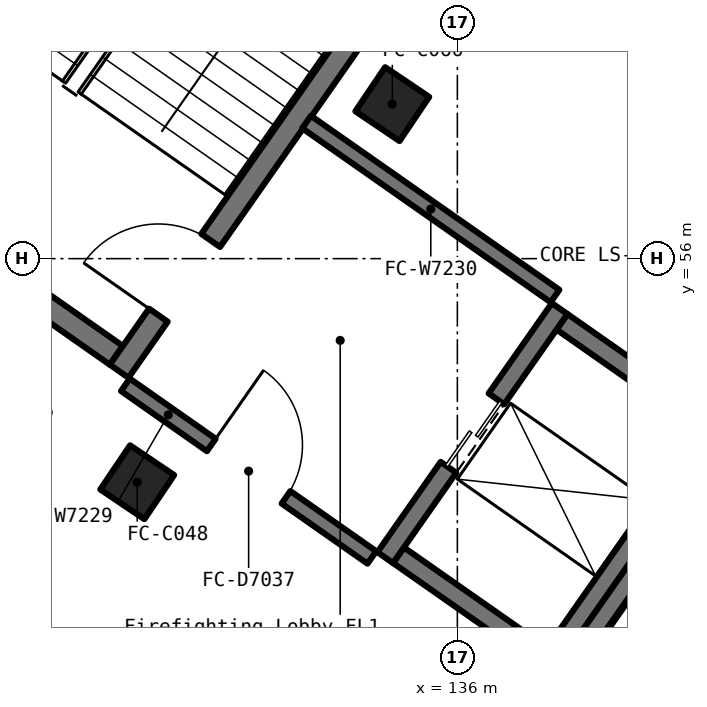
"""IFC4 building model, lengths in metres.
Left out: names, types, materials, properties, quantities, classifications, styles, units other than length and angle.
Written with IfcOpenShell. Run it as: python <this file> out.ifc"""

import sys

from ifc_helpers import new_model, si_unit, direction, frame, frame_2d, origin, origin_2d, place, context, subcontext, project, spatial, rectangle, extrude, element, fill, save


model = new_model("IFC4")
c1 = context("Model", 3, precision=1e-05, world=origin(), true_north=direction((0.0, 1.0)))
c2 = subcontext(c1, "Body", "Model", "MODEL_VIEW")
j1 = project(units=[si_unit("LENGTHUNIT", "METRE"), si_unit("PLANEANGLEUNIT", "RADIAN")], contexts=[c1])
p1 = place(None, origin())
s1 = spatial("IfcSite", under=j1, at=p1, CompositionType="ELEMENT")
p2 = place(p1, origin())
s2 = spatial("IfcBuilding", under=s1, at=p2, CompositionType="ELEMENT")
p3 = place(p2, frame((0.0, 0.0, -6.0)))
s3 = spatial("IfcBuildingStorey", under=s2, at=p3, CompositionType="ELEMENT", Elevation=-6.0)
for number, where, z_axis, x_axis in (
    (1, (131.788, 53.058, 0.0), (0.0, 0.0, 1.0), (0.829, -0.559, 0.0)),
    (2, (135.144, 58.033, 0.0), (0.0, 0.0, 1.0), (0.829, -0.559, 0.0)),
):
    element("IfcColumn", number, at=place(p3, frame(where, z_axis=z_axis, x_axis=x_axis)), inside=s3, PredefinedType="COLUMN", context=c2, shape_type="SweptSolid", body=[
        extrude(rectangle(XDim=0.7, YDim=0.7, at=origin_2d()), origin(), (0.0, 0.0, 1.0), 6.0),
    ])
p4 = place(p3, frame((127.418, 57.596, 0.0), z_axis=(0.0, 0.0, 1.0), x_axis=(0.819096538389, -0.573655698829, 0.0)))
e3 = element("IfcWall", 3, at=p4, inside=s3, PredefinedType="SOLIDWALL", context=c2, shape_type="SweptSolid", body=[
    extrude(rectangle(XDim=4.999, YDim=0.3, at=frame_2d((2.5, 0.0))), origin(), (0.0, 0.0, 1.0), 6.0),
])
p5 = place(p3, frame((131.55, 54.519, 0.0), z_axis=(0.0, 0.0, 1.0), x_axis=(0.573563925118, 0.819160804606, 0.0)))
e4 = element("IfcWall", 4, at=p5, inside=s3, PredefinedType="SOLIDWALL", context=c2, shape_type="SweptSolid", body=[
    extrude(rectangle(XDim=10.0, YDim=0.3, at=frame_2d((5.0, 0.0))), origin(), (0.0, 0.0, 1.0), 6.0),
])
p6 = place(p5, frame((0.9, 0.0, 0.0)))
e5 = element("IfcOpeningElement", 5, at=p6, cuts=e4, PredefinedType="OPENING", context=c2, shape_type="SweptSolid", body=[
    extrude(rectangle(XDim=1.2, YDim=2.1, at=frame_2d((0.6, 1.05))), frame((0.0, 0.162, 0.0), z_axis=(0.0, -1.0, 0.0), x_axis=(1.0, 0.0, 0.0)), (0.0, 0.0, 1.0), 0.324),
])
p7 = place(p3, frame((132.944, 65.751, 0.0), z_axis=(0.0, 0.0, 1.0), x_axis=(-0.573514776444, -0.819195215563, 0.0)))
e6 = element("IfcWall", 6, at=p7, inside=s3, PredefinedType="SOLIDWALL", context=c2, shape_type="SweptSolid", body=[
    extrude(rectangle(XDim=10.0, YDim=0.3, at=frame_2d((5.0, 0.0))), origin(), (0.0, 0.0, 1.0), 6.0),
])
p8 = place(p3, frame((135.225, 52.098, 0.0), z_axis=(0.0, 0.0, 1.0), x_axis=(0.819366508838, -0.573270027295, 0.0)))
e7 = element("IfcWall", 7, at=p8, inside=s3, PredefinedType="SOLIDWALL", context=c2, shape_type="SweptSolid", body=[
    extrude(rectangle(XDim=2.301, YDim=0.25, at=frame_2d((1.15, 0.0))), origin(), (0.0, 0.0, 1.0), 6.0),
])
p9 = place(p3, frame((137.141, 50.605, 0.0), z_axis=(0.0, 0.0, 1.0), x_axis=(0.573572956461, 0.819154480923, 0.0)))
e8 = element("IfcWall", 8, at=p9, inside=s3, PredefinedType="SOLIDWALL", context=c2, shape_type="SweptSolid", body=[
    extrude(rectangle(XDim=4.0, YDim=0.25, at=frame_2d((2.0, 0.0))), origin(), (0.0, 0.0, 1.0), 6.0),
])
p10 = place(p3, frame((139.261, 53.85, 0.0), z_axis=(0.0, 0.0, 1.0), x_axis=(-0.819226933165, 0.573469469089, 0.0)))
e9 = element("IfcWall", 9, at=p10, inside=s3, PredefinedType="SOLIDWALL", context=c2, shape_type="SweptSolid", body=[
    extrude(rectangle(XDim=2.3, YDim=0.25, at=frame_2d((1.15, 0.0))), origin(), (0.0, 0.0, 1.0), 6.0),
])
p11 = place(p3, frame((137.346, 55.343, 0.0), z_axis=(0.0, 0.0, 1.0), x_axis=(-0.573736768582, -0.819039755065, 0.0)))
e10 = element("IfcWall", 10, at=p11, inside=s3, PredefinedType="SOLIDWALL", context=c2, shape_type="SweptSolid", body=[
    extrude(rectangle(XDim=4.0, YDim=0.25, at=frame_2d((2.0, 0.0))), origin(), (0.0, 0.0, 1.0), 6.0),
])
p12 = place(p11, frame((1.45, 0.0, 0.0)))
e11 = element("IfcOpeningElement", 11, at=p12, cuts=e10, PredefinedType="OPENING", context=c2, shape_type="SweptSolid", body=[
    extrude(rectangle(XDim=1.1, YDim=2.1, at=frame_2d((0.55, 1.05))), frame((0.0, 0.137, 0.0), z_axis=(0.0, -1.0, 0.0), x_axis=(1.0, 0.0, 0.0)), (0.0, 0.0, 1.0), 0.274),
])
p13 = place(p3, frame((139.639, 53.737, 0.0), z_axis=(0.0, 0.0, 1.0), x_axis=(-0.573572956461, -0.819154480923, 0.0)))
e12 = element("IfcWall", 12, at=p13, inside=s3, PredefinedType="SOLIDWALL", context=c2, shape_type="SweptSolid", body=[
    extrude(rectangle(XDim=4.0, YDim=0.25, at=frame_2d((2.0, 0.0))), origin(), (0.0, 0.0, 1.0), 6.0),
])
p14 = place(p3, frame((131.632, 54.34, 0.0), z_axis=(0.0, 0.0, 1.0), x_axis=(0.81911891796, -0.573623742744, 0.0)))
e13 = element("IfcWall", 13, at=p14, inside=s3, PredefinedType="PARTITIONING", context=c2, shape_type="SweptSolid", body=[
    extrude(rectangle(XDim=3.959, YDim=0.2, at=frame_2d((1.979, 0.0))), origin(), (0.0, 0.0, 1.0), 5.78),
])
p15 = place(p14, frame((1.38, 0.0, 0.0)))
e14 = element("IfcOpeningElement", 14, at=p15, cuts=e13, PredefinedType="OPENING", context=c2, shape_type="SweptSolid", body=[
    extrude(rectangle(XDim=1.2, YDim=2.1, at=frame_2d((0.6, 1.05))), frame((0.0, 0.112, 0.0), z_axis=(0.0, -1.0, 0.0), x_axis=(1.0, 0.0, 0.0)), (0.0, 0.0, 1.0), 0.224),
])
p16 = place(p3, frame((137.285, 55.508, 0.0), z_axis=(0.0, 0.0, 1.0), x_axis=(-0.819125561737, 0.573614255497, 0.0)))
e15 = element("IfcWall", 15, at=p16, inside=s3, PredefinedType="PARTITIONING", context=c2, shape_type="SweptSolid", body=[
    extrude(rectangle(XDim=3.99, YDim=0.2, at=frame_2d((1.995, 0.0))), origin(), (0.0, 0.0, 1.0), 5.78),
])
p17 = place(p6, origin())
e16 = element("IfcDoor", 16, at=p17, inside=s3, OperationType="SINGLE_SWING_LEFT", PredefinedType="DOOR", context=c2, shape_type="SweptSolid", body=[
    extrude(rectangle(XDim=1.2, YDim=2.1, at=frame_2d((0.6, 1.05))), frame((0.0, 0.025, 0.0), z_axis=(0.0, -1.0, 0.0), x_axis=(1.0, 0.0, 0.0)), (0.0, 0.0, 1.0), 0.05),
])
fill(e5, e16)
p18 = place(p12, origin())
e17 = element("IfcDoor", 17, at=p18, inside=s3, OperationType="DOUBLE_DOOR_SLIDING", PredefinedType="DOOR", context=c2, shape_type="SweptSolid", body=[
    extrude(rectangle(XDim=1.1, YDim=2.1, at=frame_2d((0.55, 1.05))), frame((0.0, 0.025, 0.0), z_axis=(0.0, -1.0, 0.0), x_axis=(1.0, 0.0, 0.0)), (0.0, 0.0, 1.0), 0.05),
])
fill(e11, e17)
p19 = place(p15, origin())
e18 = element("IfcDoor", 18, at=p19, inside=s3, OperationType="SINGLE_SWING_LEFT", PredefinedType="DOOR", context=c2, shape_type="SweptSolid", body=[
    extrude(rectangle(XDim=1.2, YDim=2.1, at=frame_2d((0.6, 1.05))), frame((0.0, 0.025, 0.0), z_axis=(0.0, -1.0, 0.0), x_axis=(1.0, 0.0, 0.0)), (0.0, 0.0, 1.0), 0.05),
])
fill(e14, e18)
save(model, sys.argv[1])
